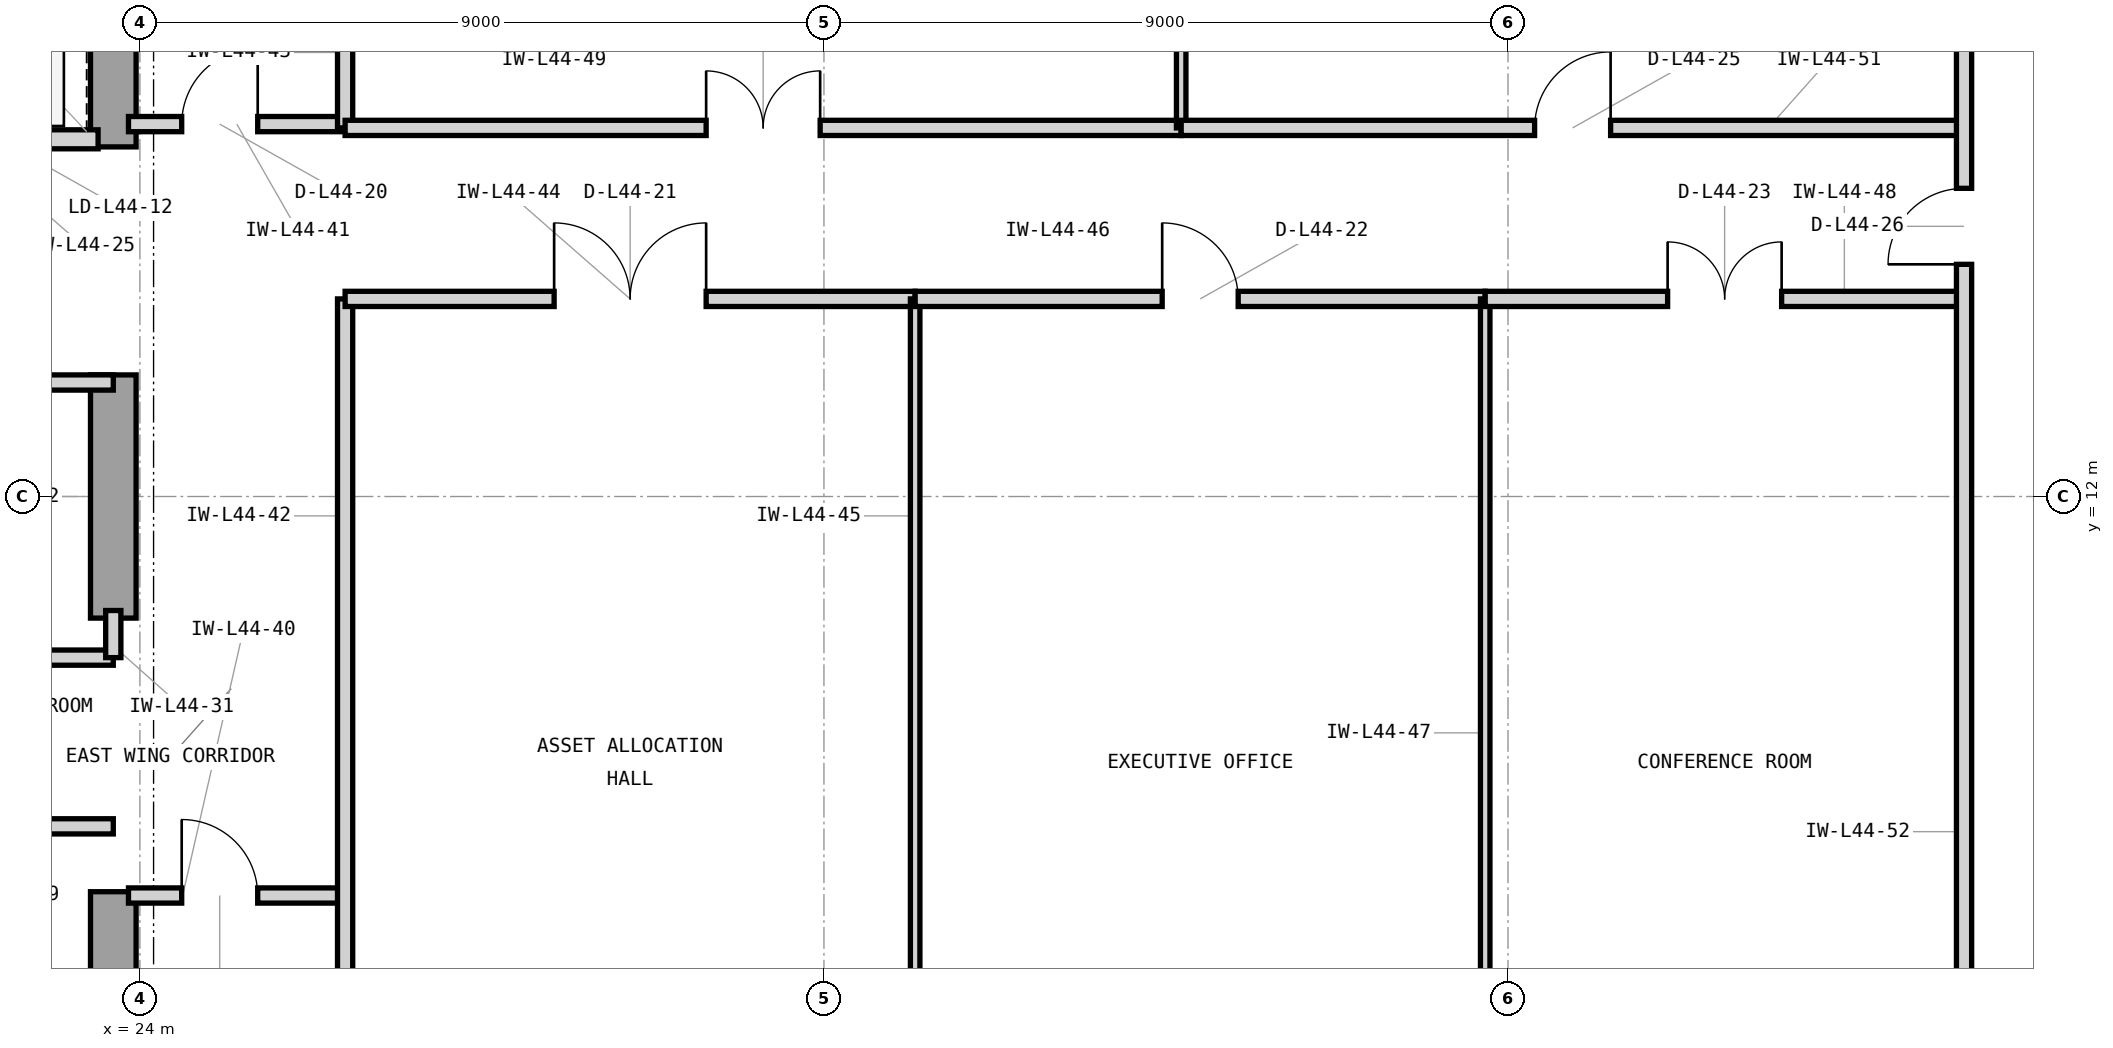
"""IFC4 building model, lengths in metres.
Left out: names, types, materials, properties, quantities, classifications, styles, units other than length and angle.
Written with IfcOpenShell. Run it as: python <this file> out.ifc"""

import sys

from ifc_helpers import new_model, si_unit, direction, frame, frame_2d, origin, place, context, subcontext, project, spatial, rectangle, extrude, element, fill, save


model = new_model("IFC4")
c1 = context("Model", 3, precision=1e-05, world=origin(), true_north=direction((0.0, 1.0)))
c2 = subcontext(c1, "Body", "Model", "MODEL_VIEW")
j1 = project(units=[si_unit("LENGTHUNIT", "METRE"), si_unit("PLANEANGLEUNIT", "RADIAN")], contexts=[c1])
p1 = place(None, origin())
s1 = spatial("IfcSite", under=j1, at=p1, CompositionType="ELEMENT")
p2 = place(p1, origin())
s2 = spatial("IfcBuilding", under=s1, at=p2, CompositionType="ELEMENT")
p3 = place(p2, frame((0.0, 0.0, 183.9)))
s3 = spatial("IfcBuildingStorey", under=s2, at=p3, CompositionType="ELEMENT", Elevation=183.9)
p4 = place(p3, frame((23.65, 3.65, 0.0), z_axis=(0.0, 0.0, 1.0), x_axis=(0.0, 1.0, 0.0)))
e1 = element("IfcWall", 1, at=p4, inside=s3, PredefinedType="SHEAR", context=c2, shape_type="SweptSolid", body=[
    extrude(rectangle(XDim=3.15, YDim=0.6, at=frame_2d((1.575, 0.0))), origin(), (0.0, 0.0, 1.0), 3.9),
])
p5 = place(p3, frame((23.65, 10.4, 0.0), z_axis=(0.0, 0.0, 1.0), x_axis=(0.0, 1.0, 0.0)))
e2 = element("IfcWall", 2, at=p5, inside=s3, PredefinedType="SHEAR", context=c2, shape_type="SweptSolid", body=[
    extrude(rectangle(XDim=3.2, YDim=0.6, at=frame_2d((1.6, 0.0))), origin(), (0.0, 0.0, 1.0), 3.9),
])
p6 = place(p3, frame((23.65, 16.6, 0.0), z_axis=(0.0, 0.0, 1.0), x_axis=(0.0, 1.0, 0.0)))
e3 = element("IfcWall", 3, at=p6, inside=s3, PredefinedType="SHEAR", context=c2, shape_type="SweptSolid", body=[
    extrude(rectangle(XDim=4.05, YDim=0.6, at=frame_2d((2.025, 0.0))), origin(), (0.0, 0.0, 1.0), 3.9),
])
p7 = place(p3, frame((21.05, 16.7, 0.0), z_axis=(0.0, 0.0, 1.0), x_axis=(1.0, 0.0, 0.0)))
e4 = element("IfcWall", 4, at=p7, inside=s3, PredefinedType="PARTITIONING", context=c2, shape_type="SweptSolid", body=[
    extrude(rectangle(XDim=2.4, YDim=0.25, at=frame_2d((1.2, 0.0))), origin(), (0.0, 0.0, 1.0), 3.283),
])
p8 = place(p7, frame((0.52, 0.0, 0.0)))
e5 = element("IfcOpeningElement", 5, at=p8, cuts=e4, PredefinedType="OPENING", context=c2, shape_type="SweptSolid", body=[
    extrude(rectangle(XDim=1.15, YDim=2.25, at=frame_2d((0.575, 1.125))), frame((0.0, 0.135, 0.0), z_axis=(0.0, -1.0, 0.0), x_axis=(1.0, 0.0, 0.0)), (0.0, 0.0, 1.0), 0.27),
])
p9 = place(p3, frame((20.85, 7.66, 0.0), z_axis=(0.0, 0.0, 1.0), x_axis=(1.0, 0.0, 0.0)))
e6 = element("IfcWall", 6, at=p9, inside=s3, PredefinedType="PARTITIONING", context=c2, shape_type="SweptSolid", body=[
    extrude(rectangle(XDim=2.8, YDim=0.2, at=frame_2d((1.4, 0.0))), origin(), (0.0, 0.0, 1.0), 3.69),
])
p10 = place(p9, frame((0.95, 0.0, 0.0)))
e7 = element("IfcOpeningElement", 7, at=p10, cuts=e6, PredefinedType="OPENING", context=c2, shape_type="SweptSolid", body=[
    extrude(rectangle(XDim=0.9, YDim=2.1, at=frame_2d((0.45, 1.05))), frame((0.0, 0.11, 0.0), z_axis=(0.0, -1.0, 0.0), x_axis=(1.0, 0.0, 0.0)), (0.0, 0.0, 1.0), 0.22),
])
p11 = place(p3, frame((14.825, 9.88, 0.0), z_axis=(0.0, 0.0, 1.0), x_axis=(1.0, 0.0, 0.0)))
e8 = element("IfcWall", 8, at=p11, inside=s3, PredefinedType="PARTITIONING", context=c2, shape_type="SweptSolid", body=[
    extrude(rectangle(XDim=8.825, YDim=0.2, at=frame_2d((4.413, 0.0))), origin(), (0.0, 0.0, 1.0), 3.69),
])
p12 = place(p3, frame((23.65, 9.88, 0.0), z_axis=(0.0, 0.0, 1.0), x_axis=(0.0, 1.0, 0.0)))
e9 = element("IfcWall", 9, at=p12, inside=s3, PredefinedType="PARTITIONING", context=c2, shape_type="SweptSolid", body=[
    extrude(rectangle(XDim=0.62, YDim=0.2, at=frame_2d((0.31, 0.0))), origin(), (0.0, 0.0, 1.0), 3.69),
])
p13 = place(p3, frame((19.9, 13.5, 0.0), z_axis=(0.0, 0.0, 1.0), x_axis=(1.0, 0.0, 0.0)))
e10 = element("IfcWall", 10, at=p13, inside=s3, PredefinedType="PARTITIONING", context=c2, shape_type="SweptSolid", body=[
    extrude(rectangle(XDim=3.75, YDim=0.2, at=frame_2d((1.875, 0.0))), origin(), (0.0, 0.0, 1.0), 3.283),
])
p14 = place(p13, frame((1.4, 0.0, 0.0)))
e11 = element("IfcOpeningElement", 11, at=p14, cuts=e10, PredefinedType="OPENING", context=c2, shape_type="SweptSolid", body=[
    extrude(rectangle(XDim=0.95, YDim=2.1, at=frame_2d((0.475, 1.05))), frame((0.0, 0.11, 0.0), z_axis=(0.0, -1.0, 0.0), x_axis=(1.0, 0.0, 0.0)), (0.0, 0.0, 1.0), 0.22),
])
p15 = place(p3, frame((23.85, 6.75, 0.0), z_axis=(0.0, 0.0, 1.0), x_axis=(1.0, 0.0, 0.0)))
e12 = element("IfcWall", 12, at=p15, inside=s3, PredefinedType="PARTITIONING", context=c2, shape_type="SweptSolid", body=[
    extrude(rectangle(XDim=2.85, YDim=0.2, at=frame_2d((1.425, 0.0))), origin(), (0.0, 0.0, 1.0), 3.69),
])
p16 = place(p15, frame((0.7, 0.0, 0.0)))
e13 = element("IfcOpeningElement", 13, at=p16, cuts=e12, PredefinedType="OPENING", context=c2, shape_type="SweptSolid", body=[
    extrude(rectangle(XDim=1.0, YDim=2.15, at=frame_2d((0.5, 1.075))), frame((0.0, 0.11, 0.0), z_axis=(0.0, -1.0, 0.0), x_axis=(1.0, 0.0, 0.0)), (0.0, 0.0, 1.0), 0.22),
])
p17 = place(p3, frame((23.85, 16.9, 0.0), z_axis=(0.0, 0.0, 1.0), x_axis=(1.0, 0.0, 0.0)))
e14 = element("IfcWall", 14, at=p17, inside=s3, PredefinedType="PARTITIONING", context=c2, shape_type="SweptSolid", body=[
    extrude(rectangle(XDim=2.85, YDim=0.2, at=frame_2d((1.425, 0.0))), origin(), (0.0, 0.0, 1.0), 3.69),
])
p18 = place(p17, frame((0.7, 0.0, 0.0)))
e15 = element("IfcOpeningElement", 15, at=p18, cuts=e14, PredefinedType="OPENING", context=c2, shape_type="SweptSolid", body=[
    extrude(rectangle(XDim=1.0, YDim=2.15, at=frame_2d((0.5, 1.075))), frame((0.0, 0.11, 0.0), z_axis=(0.0, -1.0, 0.0), x_axis=(1.0, 0.0, 0.0)), (0.0, 0.0, 1.0), 0.22),
])
p19 = place(p3, frame((26.7, 3.18, 0.0), z_axis=(0.0, 0.0, 1.0), x_axis=(0.0, 1.0, 0.0)))
e16 = element("IfcWall", 16, at=p19, inside=s3, PredefinedType="PARTITIONING", context=c2, shape_type="SweptSolid", body=[
    extrude(rectangle(XDim=11.42, YDim=0.2, at=frame_2d((5.71, 0.0))), origin(), (0.0, 0.0, 1.0), 3.69),
])
p20 = place(p3, frame((26.7, 16.85, 0.0), z_axis=(0.0, 0.0, 1.0), x_axis=(0.0, 1.0, 0.0)))
e17 = element("IfcWall", 17, at=p20, inside=s3, PredefinedType="PARTITIONING", context=c2, shape_type="SweptSolid", body=[
    extrude(rectangle(XDim=3.97, YDim=0.2, at=frame_2d((1.985, 0.0))), origin(), (0.0, 0.0, 1.0), 3.69),
])
p21 = place(p3, frame((26.7, 14.6, 0.0), z_axis=(0.0, 0.0, 1.0), x_axis=(1.0, 0.0, 0.0)))
e18 = element("IfcWall", 18, at=p21, inside=s3, PredefinedType="PARTITIONING", context=c2, shape_type="SweptSolid", body=[
    extrude(rectangle(XDim=7.5, YDim=0.2, at=frame_2d((3.75, 0.0))), origin(), (0.0, 0.0, 1.0), 3.69),
])
p22 = place(p21, frame((2.75, 0.0, 0.0)))
e19 = element("IfcOpeningElement", 19, at=p22, cuts=e18, PredefinedType="OPENING", context=c2, shape_type="SweptSolid", body=[
    extrude(rectangle(XDim=2.0, YDim=2.5, at=frame_2d((1.0, 1.25))), frame((0.0, 0.11, 0.0), z_axis=(0.0, -1.0, 0.0), x_axis=(1.0, 0.0, 0.0)), (0.0, 0.0, 1.0), 0.22),
])
p23 = place(p3, frame((34.2, 3.18, 0.0), z_axis=(0.0, 0.0, 1.0), x_axis=(0.0, 1.0, 0.0)))
e20 = element("IfcWall", 20, at=p23, inside=s3, PredefinedType="PARTITIONING", context=c2, shape_type="SweptSolid", body=[
    extrude(rectangle(XDim=11.42, YDim=0.125, at=frame_2d((5.71, 0.0))), origin(), (0.0, 0.0, 1.0), 3.69),
])
p24 = place(p3, frame((34.2, 14.6, 0.0), z_axis=(0.0, 0.0, 1.0), x_axis=(1.0, 0.0, 0.0)))
e21 = element("IfcWall", 21, at=p24, inside=s3, PredefinedType="PARTITIONING", context=c2, shape_type="SweptSolid", body=[
    extrude(rectangle(XDim=7.5, YDim=0.2, at=frame_2d((3.75, 0.0))), origin(), (0.0, 0.0, 1.0), 3.69),
])
p25 = place(p24, frame((3.25, 0.0, 0.0)))
e22 = element("IfcOpeningElement", 22, at=p25, cuts=e21, PredefinedType="OPENING", context=c2, shape_type="SweptSolid", body=[
    extrude(rectangle(XDim=1.0, YDim=2.15, at=frame_2d((0.5, 1.075))), frame((0.0, 0.11, 0.0), z_axis=(0.0, -1.0, 0.0), x_axis=(1.0, 0.0, 0.0)), (0.0, 0.0, 1.0), 0.22),
])
p26 = place(p3, frame((41.7, 3.18, 0.0), z_axis=(0.0, 0.0, 1.0), x_axis=(0.0, 1.0, 0.0)))
e23 = element("IfcWall", 23, at=p26, inside=s3, PredefinedType="PARTITIONING", context=c2, shape_type="SweptSolid", body=[
    extrude(rectangle(XDim=11.42, YDim=0.125, at=frame_2d((5.71, 0.0))), origin(), (0.0, 0.0, 1.0), 3.69),
])
p27 = place(p3, frame((41.7, 14.6, 0.0), z_axis=(0.0, 0.0, 1.0), x_axis=(1.0, 0.0, 0.0)))
e24 = element("IfcWall", 24, at=p27, inside=s3, PredefinedType="PARTITIONING", context=c2, shape_type="SweptSolid", body=[
    extrude(rectangle(XDim=6.3, YDim=0.2, at=frame_2d((3.15, 0.0))), origin(), (0.0, 0.0, 1.0), 3.69),
])
p28 = place(p27, frame((2.4, 0.0, 0.0)))
e25 = element("IfcOpeningElement", 25, at=p28, cuts=e24, PredefinedType="OPENING", context=c2, shape_type="SweptSolid", body=[
    extrude(rectangle(XDim=1.5, YDim=2.3, at=frame_2d((0.75, 1.15))), frame((0.0, 0.11, 0.0), z_axis=(0.0, -1.0, 0.0), x_axis=(1.0, 0.0, 0.0)), (0.0, 0.0, 1.0), 0.22),
])
p29 = place(p3, frame((26.7, 16.85, 0.0), z_axis=(0.0, 0.0, 1.0), x_axis=(1.0, 0.0, 0.0)))
e26 = element("IfcWall", 26, at=p29, inside=s3, PredefinedType="PARTITIONING", context=c2, shape_type="SweptSolid", body=[
    extrude(rectangle(XDim=11.0, YDim=0.2, at=frame_2d((5.5, 0.0))), origin(), (0.0, 0.0, 1.0), 3.69),
])
p30 = place(p29, frame((4.75, 0.0, 0.0)))
e27 = element("IfcOpeningElement", 27, at=p30, cuts=e26, PredefinedType="OPENING", context=c2, shape_type="SweptSolid", body=[
    extrude(rectangle(XDim=1.5, YDim=2.3, at=frame_2d((0.75, 1.15))), frame((0.0, 0.11, 0.0), z_axis=(0.0, -1.0, 0.0), x_axis=(1.0, 0.0, 0.0)), (0.0, 0.0, 1.0), 0.22),
])
p31 = place(p3, frame((37.7, 16.85, 0.0), z_axis=(0.0, 0.0, 1.0), x_axis=(0.0, 1.0, 0.0)))
e28 = element("IfcWall", 28, at=p31, inside=s3, PredefinedType="PARTITIONING", context=c2, shape_type="SweptSolid", body=[
    extrude(rectangle(XDim=3.97, YDim=0.125, at=frame_2d((1.985, 0.0))), origin(), (0.0, 0.0, 1.0), 3.69),
])
p32 = place(p3, frame((37.7, 16.85, 0.0), z_axis=(0.0, 0.0, 1.0), x_axis=(1.0, 0.0, 0.0)))
e29 = element("IfcWall", 29, at=p32, inside=s3, PredefinedType="PARTITIONING", context=c2, shape_type="SweptSolid", body=[
    extrude(rectangle(XDim=10.3, YDim=0.2, at=frame_2d((5.15, 0.0))), origin(), (0.0, 0.0, 1.0), 3.69),
])
p33 = place(p32, frame((4.65, 0.0, 0.0)))
e30 = element("IfcOpeningElement", 30, at=p33, cuts=e29, PredefinedType="OPENING", context=c2, shape_type="SweptSolid", body=[
    extrude(rectangle(XDim=1.0, YDim=2.15, at=frame_2d((0.5, 1.075))), frame((0.0, 0.11, 0.0), z_axis=(0.0, -1.0, 0.0), x_axis=(1.0, 0.0, 0.0)), (0.0, 0.0, 1.0), 0.22),
])
p34 = place(p3, frame((48.0, 3.18, 0.0), z_axis=(0.0, 0.0, 1.0), x_axis=(0.0, 1.0, 0.0)))
e31 = element("IfcWall", 31, at=p34, inside=s3, PredefinedType="PARTITIONING", context=c2, shape_type="SweptSolid", body=[
    extrude(rectangle(XDim=17.64, YDim=0.2, at=frame_2d((8.82, 0.0))), origin(), (0.0, 0.0, 1.0), 3.073),
])
p35 = place(p34, frame((11.875, 0.0, 0.0)))
e32 = element("IfcOpeningElement", 32, at=p35, cuts=e31, PredefinedType="OPENING", context=c2, shape_type="SweptSolid", body=[
    extrude(rectangle(XDim=1.0, YDim=2.15, at=frame_2d((0.5, 1.075))), frame((0.0, 0.11, 0.0), z_axis=(0.0, -1.0, 0.0), x_axis=(1.0, 0.0, 0.0)), (0.0, 0.0, 1.0), 0.22),
])
p36 = place(p16, origin())
e33 = element("IfcDoor", 33, at=p36, inside=s3, OperationType="SINGLE_SWING_LEFT", PredefinedType="DOOR", context=c2, shape_type="SweptSolid", body=[
    extrude(rectangle(XDim=1.0, YDim=2.15, at=frame_2d((0.5, 1.075))), frame((0.0, 0.025, 0.0), z_axis=(0.0, -1.0, 0.0), x_axis=(1.0, 0.0, 0.0)), (0.0, 0.0, 1.0), 0.05),
])
fill(e13, e33)
p37 = place(p18, origin())
e34 = element("IfcDoor", 34, at=p37, inside=s3, OperationType="SINGLE_SWING_RIGHT", PredefinedType="DOOR", context=c2, shape_type="SweptSolid", body=[
    extrude(rectangle(XDim=1.0, YDim=2.15, at=frame_2d((0.5, 1.075))), frame((0.0, 0.025, 0.0), z_axis=(0.0, -1.0, 0.0), x_axis=(1.0, 0.0, 0.0)), (0.0, 0.0, 1.0), 0.05),
])
fill(e15, e34)
p38 = place(p22, origin())
e35 = element("IfcDoor", 35, at=p38, inside=s3, OperationType="DOUBLE_DOOR_SINGLE_SWING", PredefinedType="DOOR", context=c2, shape_type="SweptSolid", body=[
    extrude(rectangle(XDim=2.0, YDim=2.5, at=frame_2d((1.0, 1.25))), frame((0.0, 0.025, 0.0), z_axis=(0.0, -1.0, 0.0), x_axis=(1.0, 0.0, 0.0)), (0.0, 0.0, 1.0), 0.05),
])
fill(e19, e35)
p39 = place(p25, origin())
e36 = element("IfcDoor", 36, at=p39, inside=s3, OperationType="SINGLE_SWING_LEFT", PredefinedType="DOOR", context=c2, shape_type="SweptSolid", body=[
    extrude(rectangle(XDim=1.0, YDim=2.15, at=frame_2d((0.5, 1.075))), frame((0.0, 0.025, 0.0), z_axis=(0.0, -1.0, 0.0), x_axis=(1.0, 0.0, 0.0)), (0.0, 0.0, 1.0), 0.05),
])
fill(e22, e36)
p40 = place(p28, origin())
e37 = element("IfcDoor", 37, at=p40, inside=s3, OperationType="DOUBLE_DOOR_SINGLE_SWING", PredefinedType="DOOR", context=c2, shape_type="SweptSolid", body=[
    extrude(rectangle(XDim=1.5, YDim=2.3, at=frame_2d((0.75, 1.15))), frame((0.0, 0.025, 0.0), z_axis=(0.0, -1.0, 0.0), x_axis=(1.0, 0.0, 0.0)), (0.0, 0.0, 1.0), 0.05),
])
fill(e25, e37)
p41 = place(p30, origin())
e38 = element("IfcDoor", 38, at=p41, inside=s3, OperationType="DOUBLE_DOOR_SINGLE_SWING", PredefinedType="DOOR", context=c2, shape_type="SweptSolid", body=[
    extrude(rectangle(XDim=1.5, YDim=2.3, at=frame_2d((0.75, 1.15))), frame((0.0, 0.025, 0.0), z_axis=(0.0, -1.0, 0.0), x_axis=(1.0, 0.0, 0.0)), (0.0, 0.0, 1.0), 0.05),
])
fill(e27, e38)
p42 = place(p33, origin())
e39 = element("IfcDoor", 39, at=p42, inside=s3, OperationType="SINGLE_SWING_RIGHT", PredefinedType="DOOR", context=c2, shape_type="SweptSolid", body=[
    extrude(rectangle(XDim=1.0, YDim=2.15, at=frame_2d((0.5, 1.075))), frame((0.0, 0.025, 0.0), z_axis=(0.0, -1.0, 0.0), x_axis=(1.0, 0.0, 0.0)), (0.0, 0.0, 1.0), 0.05),
])
fill(e30, e39)
p43 = place(p35, origin())
e40 = element("IfcDoor", 40, at=p43, inside=s3, OperationType="SINGLE_SWING_LEFT", PredefinedType="DOOR", context=c2, shape_type="SweptSolid", body=[
    extrude(rectangle(XDim=1.0, YDim=2.15, at=frame_2d((0.5, 1.075))), frame((0.0, 0.025, 0.0), z_axis=(0.0, -1.0, 0.0), x_axis=(1.0, 0.0, 0.0)), (0.0, 0.0, 1.0), 0.05),
])
fill(e32, e40)
save(model, sys.argv[1])
